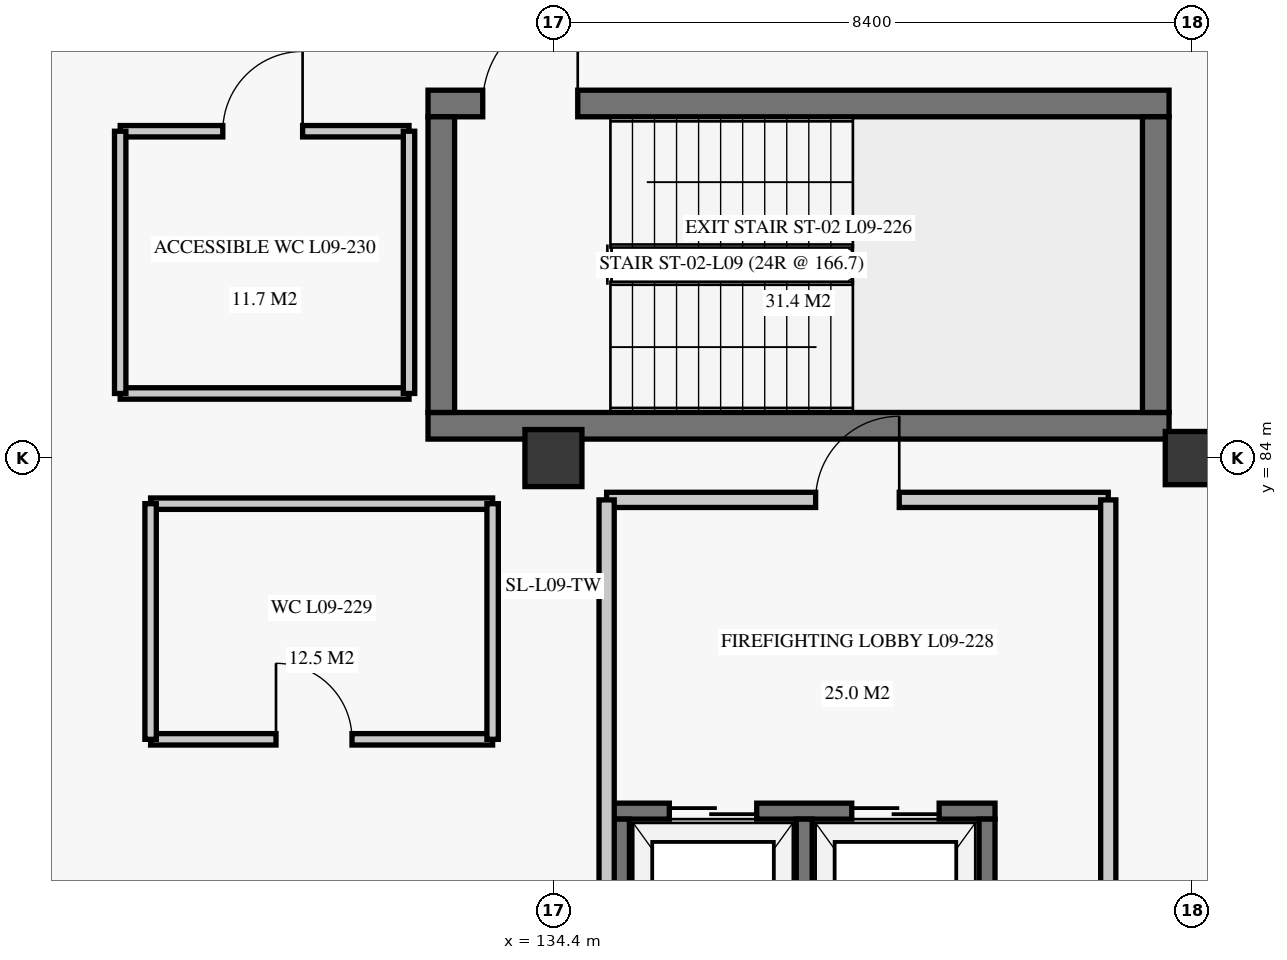
"""IFC4 building model, lengths in metres.
Left out: names, types, materials, properties, quantities, classifications, styles, units other than length and angle.
Written with IfcOpenShell. Run it as: python <this file> out.ifc"""

import sys

from ifc_helpers import new_model, si_unit, direction, frame, frame_2d, origin, origin_2d, place, context, subcontext, project, spatial, rectangle, extrude, element, fill, save


model = new_model("IFC4")
c1 = context("Model", 3, precision=1e-05, world=origin(), true_north=direction((0.0, 1.0)))
c2 = subcontext(c1, "Body", "Model", "MODEL_VIEW")
j1 = project(units=[si_unit("LENGTHUNIT", "METRE"), si_unit("PLANEANGLEUNIT", "RADIAN")], contexts=[c1])
p1 = place(None, origin())
s1 = spatial("IfcSite", under=j1, at=p1, CompositionType="ELEMENT")
p2 = place(p1, origin())
s2 = spatial("IfcBuilding", under=s1, at=p2, CompositionType="ELEMENT")
p3 = place(p2, frame((0.0, 0.0, 38.7)))
s3 = spatial("IfcBuildingStorey", under=s2, at=p3, CompositionType="ELEMENT", Elevation=38.7)
p4 = place(p3, frame((134.4, 84.0, 0.0), z_axis=(0.0, 0.0, 1.0), x_axis=(1.0, 0.0, 0.0)))
e1 = element("IfcColumn", 1, at=p4, inside=s3, PredefinedType="COLUMN", context=c2, shape_type="SweptSolid", body=[
    extrude(rectangle(XDim=0.75, YDim=0.75, at=origin_2d()), origin(), (0.0, 0.0, 1.0), 3.72),
])
p5 = place(p3, frame((142.8, 84.0, 0.0), z_axis=(0.0, 0.0, 1.0), x_axis=(1.0, 0.0, 0.0)))
e2 = element("IfcColumn", 2, at=p5, inside=s3, PredefinedType="COLUMN", context=c2, shape_type="SweptSolid", body=[
    extrude(rectangle(XDim=0.7, YDim=0.7, at=origin_2d()), origin(), (0.0, 0.0, 1.0), 3.72),
])
p6 = place(p3, frame((132.75, 84.425, 0.0), z_axis=(0.0, 0.0, 1.0), x_axis=(1.0, 0.0, 0.0)))
e3 = element("IfcWall", 3, at=p6, inside=s3, PredefinedType="SHEAR", context=c2, shape_type="SweptSolid", body=[
    extrude(rectangle(XDim=9.75, YDim=0.35, at=frame_2d((4.875, 0.0))), origin(), (0.0, 0.0, 1.0), 3.72),
])
p7 = place(p3, frame((132.75, 88.665, 0.0), z_axis=(0.0, 0.0, 1.0), x_axis=(1.0, 0.0, 0.0)))
e4 = element("IfcWall", 4, at=p7, inside=s3, PredefinedType="SHEAR", context=c2, shape_type="SweptSolid", body=[
    extrude(rectangle(XDim=9.75, YDim=0.35, at=frame_2d((4.875, 0.0))), origin(), (0.0, 0.0, 1.0), 3.72),
])
p8 = place(p7, frame((0.72, 0.0, 0.0)))
e5 = element("IfcOpeningElement", 5, at=p8, cuts=e4, PredefinedType="OPENING", context=c2, shape_type="SweptSolid", body=[
    extrude(rectangle(XDim=1.25, YDim=2.2, at=frame_2d((0.625, 1.1))), frame((0.0, 0.185, 0.0), z_axis=(0.0, -1.0, 0.0), x_axis=(1.0, 0.0, 0.0)), (0.0, 0.0, 1.0), 0.37),
])
for number, where, z_axis, x_axis in (
    (6, (132.925, 84.6, 0.0), (0.0, 0.0, 1.0), (0.0, 1.0, 0.0)),
    (7, (142.325, 84.6, 0.0), (0.0, 0.0, 1.0), (0.0, 1.0, 0.0)),
):
    element("IfcWall", number, at=place(p3, frame(where, z_axis=z_axis, x_axis=x_axis)), inside=s3, PredefinedType="SHEAR", context=c2, shape_type="SweptSolid", body=[
        extrude(rectangle(XDim=3.89, YDim=0.35, at=frame_2d((1.945, 0.0))), origin(), (0.0, 0.0, 1.0), 3.72),
    ])
p9 = place(p3, frame((135.19, 79.355, 0.0), z_axis=(0.0, 0.0, 1.0), x_axis=(1.0, 0.0, 0.0)))
e8 = element("IfcWall", 8, at=p9, inside=s3, PredefinedType="SHEAR", context=c2, shape_type="SweptSolid", body=[
    extrude(rectangle(XDim=5.02, YDim=0.21, at=frame_2d((2.51, 0.0))), origin(), (0.0, 0.0, 1.0), 3.72),
])
p10 = place(p9, frame((0.735, 0.0, 0.0)))
e9 = element("IfcOpeningElement", 9, at=p10, cuts=e8, PredefinedType="OPENING", context=c2, shape_type="SweptSolid", body=[
    extrude(rectangle(XDim=1.15, YDim=2.2, at=frame_2d((0.575, 1.1))), frame((0.0, 0.115, 0.0), z_axis=(0.0, -1.0, 0.0), x_axis=(1.0, 0.0, 0.0)), (0.0, 0.0, 1.0), 0.23),
])
p11 = place(p9, frame((3.135, 0.0, 0.0)))
e10 = element("IfcOpeningElement", 10, at=p11, cuts=e8, PredefinedType="OPENING", context=c2, shape_type="SweptSolid", body=[
    extrude(rectangle(XDim=1.15, YDim=2.2, at=frame_2d((0.575, 1.1))), frame((0.0, 0.115, 0.0), z_axis=(0.0, -1.0, 0.0), x_axis=(1.0, 0.0, 0.0)), (0.0, 0.0, 1.0), 0.23),
])
for number, where, z_axis, x_axis in (
    (11, (135.295, 76.25, 0.0), (0.0, 0.0, 1.0), (0.0, 1.0, 0.0)),
    (12, (140.105, 76.25, 0.0), (0.0, 0.0, 1.0), (0.0, 1.0, 0.0)),
    (13, (137.7, 76.25, 0.0), (0.0, 0.0, 1.0), (0.0, 1.0, 0.0)),
):
    element("IfcWall", number, at=place(p3, frame(where, z_axis=z_axis, x_axis=x_axis)), inside=s3, PredefinedType="SHEAR", context=c2, shape_type="SweptSolid", body=[
        extrude(rectangle(XDim=3.0, YDim=0.21, at=frame_2d((1.5, 0.0))), origin(), (0.0, 0.0, 1.0), 3.72),
    ])
p12 = place(p3, frame((135.1, 83.45, 0.0), z_axis=(0.0, 0.0, 1.0), x_axis=(1.0, 0.0, 0.0)))
e14 = element("IfcWall", 14, at=p12, inside=s3, PredefinedType="PARTITIONING", context=c2, shape_type="SweptSolid", body=[
    extrude(rectangle(XDim=6.6, YDim=0.2, at=frame_2d((3.3, 0.0))), origin(), (0.0, 0.0, 1.0), 3.34),
])
p13 = place(p12, frame((2.75, 0.0, 0.0)))
e15 = element("IfcOpeningElement", 15, at=p13, cuts=e14, PredefinedType="OPENING", context=c2, shape_type="SweptSolid", body=[
    extrude(rectangle(XDim=1.1, YDim=2.2, at=frame_2d((0.55, 1.1))), frame((0.0, 0.11, 0.0), z_axis=(0.0, -1.0, 0.0), x_axis=(1.0, 0.0, 0.0)), (0.0, 0.0, 1.0), 0.22),
])
for number, where, z_axis, x_axis in (
    (16, (135.1, 76.2, 0.0), (0.0, 0.0, 1.0), (0.0, 1.0, 0.0)),
    (17, (141.7, 76.2, 0.0), (0.0, 0.0, 1.0), (0.0, 1.0, 0.0)),
):
    element("IfcWall", number, at=place(p3, frame(where, z_axis=z_axis, x_axis=x_axis)), inside=s3, PredefinedType="PARTITIONING", context=c2, shape_type="SweptSolid", body=[
        extrude(rectangle(XDim=7.25, YDim=0.2, at=frame_2d((3.625, 0.0))), origin(), (0.0, 0.0, 1.0), 3.34),
    ])
p14 = place(p3, frame((129.1, 80.3, 0.0), z_axis=(0.0, 0.0, 1.0), x_axis=(1.0, 0.0, 0.0)))
e18 = element("IfcWall", 18, at=p14, inside=s3, PredefinedType="PARTITIONING", context=c2, shape_type="SweptSolid", body=[
    extrude(rectangle(XDim=4.5, YDim=0.15, at=frame_2d((2.25, 0.0))), origin(), (0.0, 0.0, 1.0), 3.34),
])
p15 = place(p14, frame((1.65, 0.0, 0.0)))
e19 = element("IfcOpeningElement", 19, at=p15, cuts=e18, PredefinedType="OPENING", context=c2, shape_type="SweptSolid", body=[
    extrude(rectangle(XDim=1.0, YDim=2.1, at=frame_2d((0.5, 1.05))), frame((0.0, 0.085, 0.0), z_axis=(0.0, -1.0, 0.0), x_axis=(1.0, 0.0, 0.0)), (0.0, 0.0, 1.0), 0.17),
])
p16 = place(p3, frame((129.1, 83.4, 0.0), z_axis=(0.0, 0.0, 1.0), x_axis=(1.0, 0.0, 0.0)))
e20 = element("IfcWall", 20, at=p16, inside=s3, PredefinedType="PARTITIONING", context=c2, shape_type="SweptSolid", body=[
    extrude(rectangle(XDim=4.5, YDim=0.15, at=frame_2d((2.25, 0.0))), origin(), (0.0, 0.0, 1.0), 3.34),
])
for number, where, z_axis, x_axis in (
    (21, (129.1, 80.3, 0.0), (0.0, 0.0, 1.0), (0.0, 1.0, 0.0)),
    (22, (133.6, 80.3, 0.0), (0.0, 0.0, 1.0), (0.0, 1.0, 0.0)),
):
    element("IfcWall", number, at=place(p3, frame(where, z_axis=z_axis, x_axis=x_axis)), inside=s3, PredefinedType="PARTITIONING", context=c2, shape_type="SweptSolid", body=[
        extrude(rectangle(XDim=3.1, YDim=0.15, at=frame_2d((1.55, 0.0))), origin(), (0.0, 0.0, 1.0), 3.34),
    ])
p17 = place(p3, frame((128.7, 88.3, 0.0), z_axis=(0.0, 0.0, 1.0), x_axis=(1.0, 0.0, 0.0)))
e23 = element("IfcWall", 23, at=p17, inside=s3, PredefinedType="PARTITIONING", context=c2, shape_type="SweptSolid", body=[
    extrude(rectangle(XDim=3.8, YDim=0.15, at=frame_2d((1.9, 0.0))), origin(), (0.0, 0.0, 1.0), 3.34),
])
p18 = place(p17, frame((1.35, 0.0, 0.0)))
e24 = element("IfcOpeningElement", 24, at=p18, cuts=e23, PredefinedType="OPENING", context=c2, shape_type="SweptSolid", body=[
    extrude(rectangle(XDim=1.05, YDim=2.15, at=frame_2d((0.525, 1.075))), frame((0.0, 0.085, 0.0), z_axis=(0.0, -1.0, 0.0), x_axis=(1.0, 0.0, 0.0)), (0.0, 0.0, 1.0), 0.17),
])
p19 = place(p3, frame((128.7, 84.85, 0.0), z_axis=(0.0, 0.0, 1.0), x_axis=(1.0, 0.0, 0.0)))
e25 = element("IfcWall", 25, at=p19, inside=s3, PredefinedType="PARTITIONING", context=c2, shape_type="SweptSolid", body=[
    extrude(rectangle(XDim=3.8, YDim=0.15, at=frame_2d((1.9, 0.0))), origin(), (0.0, 0.0, 1.0), 3.34),
])
for number, where, z_axis, x_axis in (
    (26, (128.7, 84.85, 0.0), (0.0, 0.0, 1.0), (0.0, 1.0, 0.0)),
    (27, (132.5, 84.85, 0.0), (0.0, 0.0, 1.0), (0.0, 1.0, 0.0)),
):
    element("IfcWall", number, at=place(p3, frame(where, z_axis=z_axis, x_axis=x_axis)), inside=s3, PredefinedType="PARTITIONING", context=c2, shape_type="SweptSolid", body=[
        extrude(rectangle(XDim=3.45, YDim=0.15, at=frame_2d((1.725, 0.0))), origin(), (0.0, 0.0, 1.0), 3.34),
    ])
p20 = place(p8, origin())
e28 = element("IfcDoor", 28, at=p20, inside=s3, OperationType="SINGLE_SWING_RIGHT", PredefinedType="DOOR", context=c2, shape_type="SweptSolid", body=[
    extrude(rectangle(XDim=1.25, YDim=2.2, at=frame_2d((0.625, 1.1))), frame((0.0, 0.025, 0.0), z_axis=(0.0, -1.0, 0.0), x_axis=(1.0, 0.0, 0.0)), (0.0, 0.0, 1.0), 0.05),
])
fill(e5, e28)
p21 = place(p10, origin())
e29 = element("IfcDoor", 29, at=p21, inside=s3, OperationType="DOUBLE_DOOR_SLIDING", PredefinedType="DOOR", context=c2, shape_type="SweptSolid", body=[
    extrude(rectangle(XDim=1.15, YDim=2.2, at=frame_2d((0.575, 1.1))), frame((0.0, 0.025, 0.0), z_axis=(0.0, -1.0, 0.0), x_axis=(1.0, 0.0, 0.0)), (0.0, 0.0, 1.0), 0.05),
])
fill(e9, e29)
p22 = place(p11, origin())
e30 = element("IfcDoor", 30, at=p22, inside=s3, OperationType="DOUBLE_DOOR_SLIDING", PredefinedType="DOOR", context=c2, shape_type="SweptSolid", body=[
    extrude(rectangle(XDim=1.15, YDim=2.2, at=frame_2d((0.575, 1.1))), frame((0.0, 0.025, 0.0), z_axis=(0.0, -1.0, 0.0), x_axis=(1.0, 0.0, 0.0)), (0.0, 0.0, 1.0), 0.05),
])
fill(e10, e30)
p23 = place(p13, origin())
e31 = element("IfcDoor", 31, at=p23, inside=s3, OperationType="SINGLE_SWING_RIGHT", PredefinedType="DOOR", context=c2, shape_type="SweptSolid", body=[
    extrude(rectangle(XDim=1.1, YDim=2.2, at=frame_2d((0.55, 1.1))), frame((0.0, 0.025, 0.0), z_axis=(0.0, -1.0, 0.0), x_axis=(1.0, 0.0, 0.0)), (0.0, 0.0, 1.0), 0.05),
])
fill(e15, e31)
p24 = place(p15, origin())
e32 = element("IfcDoor", 32, at=p24, inside=s3, OperationType="SINGLE_SWING_LEFT", PredefinedType="DOOR", context=c2, shape_type="SweptSolid", body=[
    extrude(rectangle(XDim=1.0, YDim=2.1, at=frame_2d((0.5, 1.05))), frame((0.0, 0.025, 0.0), z_axis=(0.0, -1.0, 0.0), x_axis=(1.0, 0.0, 0.0)), (0.0, 0.0, 1.0), 0.05),
])
fill(e19, e32)
p25 = place(p18, origin())
e33 = element("IfcDoor", 33, at=p25, inside=s3, OperationType="SINGLE_SWING_RIGHT", PredefinedType="DOOR", context=c2, shape_type="SweptSolid", body=[
    extrude(rectangle(XDim=1.05, YDim=2.15, at=frame_2d((0.525, 1.075))), frame((0.0, 0.025, 0.0), z_axis=(0.0, -1.0, 0.0), x_axis=(1.0, 0.0, 0.0)), (0.0, 0.0, 1.0), 0.05),
])
fill(e24, e33)
save(model, sys.argv[1])
